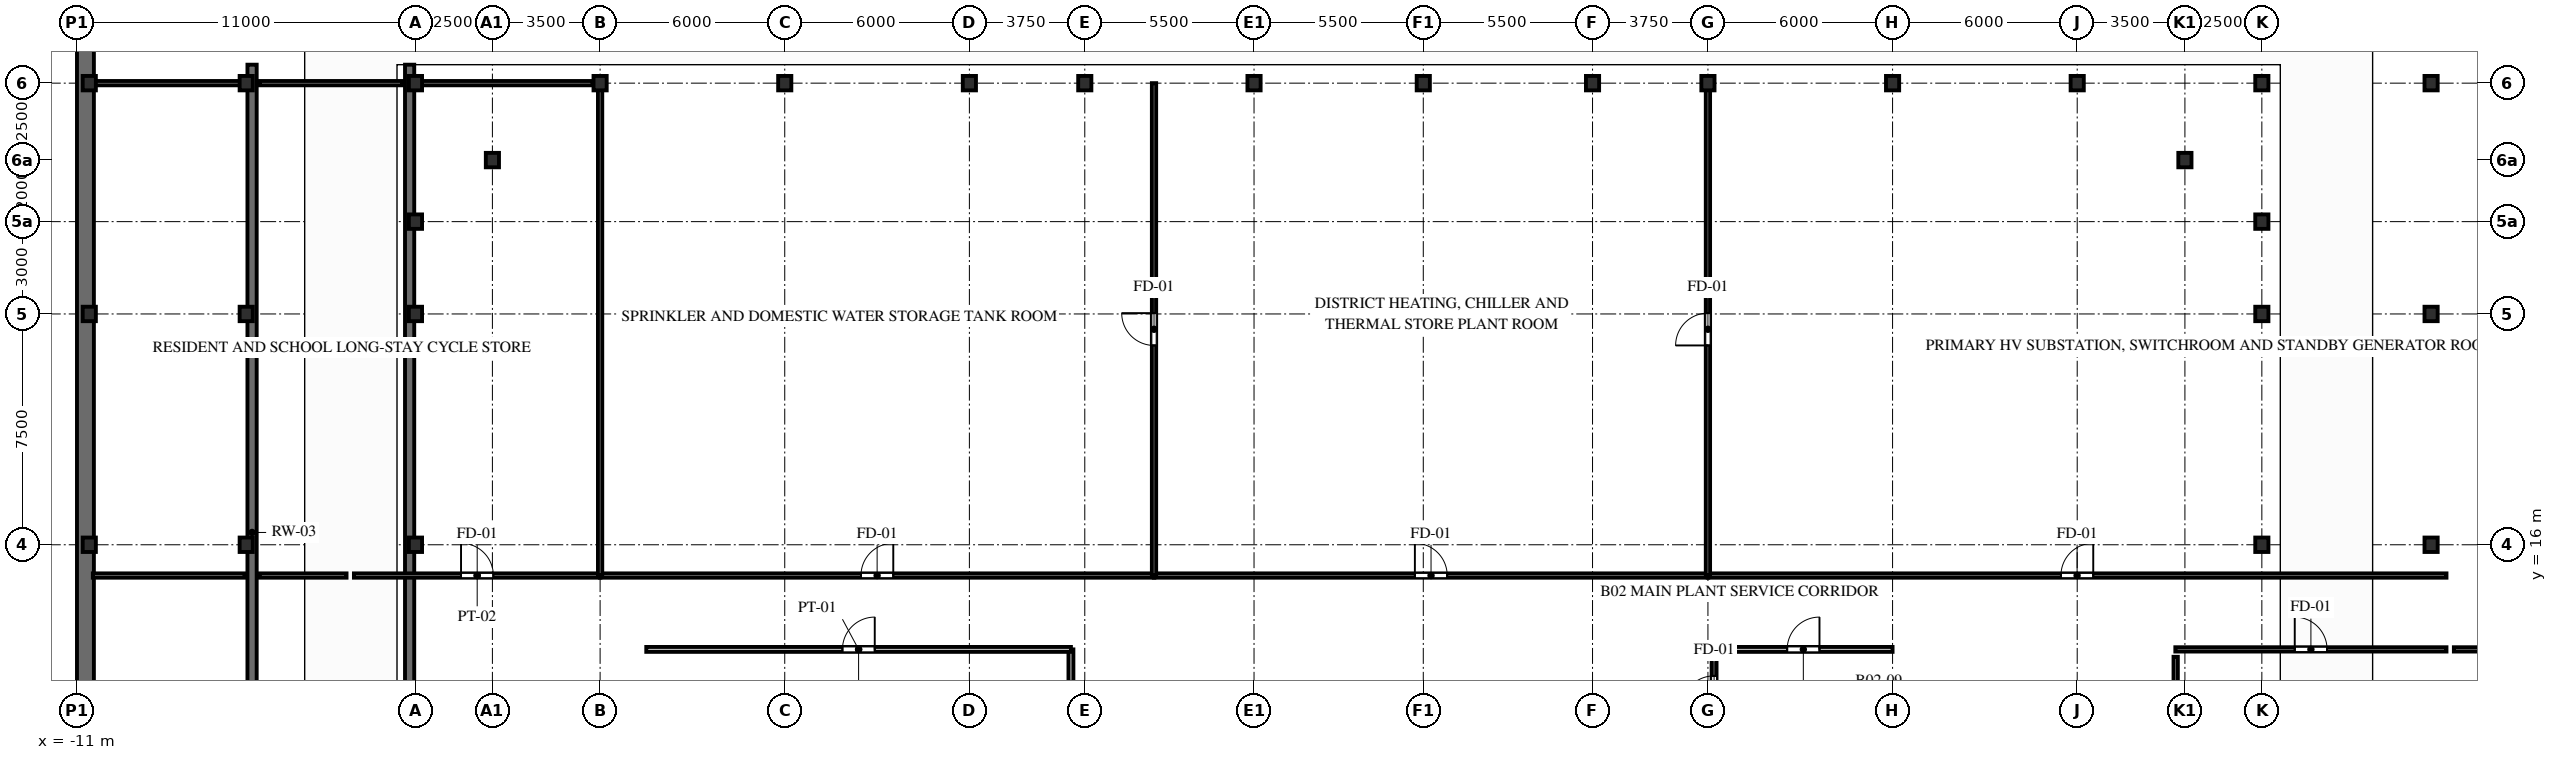
"""IFC4 building model, lengths in metres.
Left out: names, types, materials, properties, quantities, classifications, styles, units other than length and angle.
Written with IfcOpenShell. Run it as: python <this file> out.ifc"""

import sys

from ifc_helpers import new_model, si_unit, direction, frame, frame_2d, origin, origin_2d, place, context, subcontext, project, spatial, rectangle, i_section, extrude, element, fill, save


model = new_model("IFC4")
c1 = context("Model", 3, precision=1e-05, world=origin(), true_north=direction((0.0, 1.0)))
c2 = subcontext(c1, "Body", "Model", "MODEL_VIEW")
j1 = project(units=[si_unit("LENGTHUNIT", "METRE"), si_unit("PLANEANGLEUNIT", "RADIAN")], contexts=[c1])
p1 = place(None, origin())
s1 = spatial("IfcSite", under=j1, at=p1, CompositionType="ELEMENT")
p2 = place(p1, origin())
s2 = spatial("IfcBuilding", under=s1, at=p2, CompositionType="ELEMENT")
p3 = place(p2, frame((0.0, 0.0, -8.4)))
s3 = spatial("IfcBuildingStorey", under=s2, at=p3, CompositionType="ELEMENT", Elevation=-8.4)
for number, where, z_axis, x_axis in (
    (1, (-10.6, 16.0, 0.0), (0.0, 0.0, 1.0), (1.0, 0.0, 0.0)),
    (2, (-10.6, 23.5, 0.0), (0.0, 0.0, 1.0), (1.0, 0.0, 0.0)),
    (3, (-10.6, 31.0, 0.0), (0.0, 0.0, 1.0), (1.0, 0.0, 0.0)),
    (4, (-5.5, 16.0, 0.0), (0.0, 0.0, 1.0), (1.0, 0.0, 0.0)),
    (5, (-5.5, 23.5, 0.0), (0.0, 0.0, 1.0), (1.0, 0.0, 0.0)),
    (6, (-5.5, 31.0, 0.0), (0.0, 0.0, 1.0), (1.0, 0.0, 0.0)),
    (7, (0.0, 16.0, 0.0), (0.0, 0.0, 1.0), (1.0, 0.0, 0.0)),
    (8, (0.0, 23.5, 0.0), (0.0, 0.0, 1.0), (1.0, 0.0, 0.0)),
    (9, (0.0, 26.5, 0.0), (0.0, 0.0, 1.0), (1.0, 0.0, 0.0)),
    (10, (0.0, 31.0, 0.0), (0.0, 0.0, 1.0), (1.0, 0.0, 0.0)),
    (11, (2.5, 28.5, 0.0), (0.0, 0.0, 1.0), (1.0, 0.0, 0.0)),
    (12, (6.0, 31.0, 0.0), (0.0, 0.0, 1.0), (1.0, 0.0, 0.0)),
    (13, (12.0, 31.0, 0.0), (0.0, 0.0, 1.0), (1.0, 0.0, 0.0)),
    (14, (18.0, 31.0, 0.0), (0.0, 0.0, 1.0), (1.0, 0.0, 0.0)),
    (15, (21.75, 31.0, 0.0), (0.0, 0.0, 1.0), (1.0, 0.0, 0.0)),
    (16, (27.25, 31.0, 0.0), (0.0, 0.0, 1.0), (1.0, 0.0, 0.0)),
    (17, (32.75, 31.0, 0.0), (0.0, 0.0, 1.0), (1.0, 0.0, 0.0)),
    (18, (38.25, 31.0, 0.0), (0.0, 0.0, 1.0), (1.0, 0.0, 0.0)),
    (19, (42.0, 31.0, 0.0), (0.0, 0.0, 1.0), (1.0, 0.0, 0.0)),
    (20, (48.0, 31.0, 0.0), (0.0, 0.0, 1.0), (1.0, 0.0, 0.0)),
    (21, (54.0, 31.0, 0.0), (0.0, 0.0, 1.0), (1.0, 0.0, 0.0)),
    (22, (57.5, 28.5, 0.0), (0.0, 0.0, 1.0), (1.0, 0.0, 0.0)),
    (23, (60.0, 16.0, 0.0), (0.0, 0.0, 1.0), (1.0, 0.0, 0.0)),
    (24, (60.0, 23.5, 0.0), (0.0, 0.0, 1.0), (1.0, 0.0, 0.0)),
    (25, (60.0, 26.5, 0.0), (0.0, 0.0, 1.0), (1.0, 0.0, 0.0)),
    (26, (60.0, 31.0, 0.0), (0.0, 0.0, 1.0), (1.0, 0.0, 0.0)),
    (27, (65.5, 16.0, 0.0), (0.0, 0.0, 1.0), (1.0, 0.0, 0.0)),
    (28, (65.5, 23.5, 0.0), (0.0, 0.0, 1.0), (1.0, 0.0, 0.0)),
    (29, (65.5, 31.0, 0.0), (0.0, 0.0, 1.0), (1.0, 0.0, 0.0)),
):
    element("IfcColumn", number, at=place(p3, frame(where, z_axis=z_axis, x_axis=x_axis)), inside=s3, PredefinedType="COLUMN", context=c2, shape_type="SweptSolid", body=[
        extrude(i_section(OverallWidth=0.428, OverallDepth=0.469, WebThickness=0.078, FlangeThickness=0.125, FilletRadius=0.015, at=origin_2d()), origin(), (0.0, 0.0, 1.0), 4.2),
    ])
for number, where, z_axis, x_axis in (
    (30, (-5.31, 1.2, 0.0), (0.0, 0.0, 1.0), (0.0, 1.0, 0.0)),
    (31, (-0.19, 1.2, 0.0), (0.0, 0.0, 1.0), (0.0, 1.0, 0.0)),
):
    element("IfcWall", number, at=place(p3, frame(where, z_axis=z_axis, x_axis=x_axis)), inside=s3, PredefinedType="SHEAR", context=c2, shape_type="SweptSolid", body=[
        extrude(rectangle(XDim=30.4, YDim=0.3, at=frame_2d((15.2, 0.0))), origin(), (0.0, 0.0, 1.0), 3.84),
    ])
p4 = place(p3, frame((-10.725, 39.725, 0.0), z_axis=(0.0, 0.0, 1.0), x_axis=(0.0, -1.0, 0.0)))
e32 = element("IfcWall", 32, at=p4, inside=s3, PredefinedType="SHEAR", context=c2, shape_type="SweptSolid", body=[
    extrude(rectangle(XDim=41.45, YDim=0.55, at=frame_2d((20.725, 0.0))), origin(), (0.0, 0.0, 1.0), 3.2),
])
p5 = place(p3, frame((21.3, 9.5, 0.0), z_axis=(0.0, 0.0, 1.0), x_axis=(0.0, 1.0, 0.0)))
e33 = element("IfcWall", 33, at=p5, inside=s3, PredefinedType="PARTITIONING", context=c2, shape_type="SweptSolid", body=[
    extrude(rectangle(XDim=3.1, YDim=0.16, at=frame_2d((1.55, 0.0))), origin(), (0.0, 0.0, 1.0), 2.894),
])
p6 = place(p5, frame((1.025, 0.0, 0.0)))
e34 = element("IfcOpeningElement", 34, at=p6, cuts=e33, PredefinedType="OPENING", context=c2, shape_type="SweptSolid", body=[
    extrude(rectangle(XDim=1.05, YDim=2.06, at=frame_2d((0.525, 1.03))), frame((0.0, 0.09, 0.0), z_axis=(0.0, -1.0, 0.0), x_axis=(1.0, 0.0, 0.0)), (0.0, 0.0, 1.0), 0.18),
])
p7 = place(p3, frame((7.5, 12.6, 0.0), z_axis=(0.0, 0.0, 1.0), x_axis=(1.0, 0.0, 0.0)))
e35 = element("IfcWall", 35, at=p7, inside=s3, PredefinedType="PARTITIONING", context=c2, shape_type="SweptSolid", body=[
    extrude(rectangle(XDim=13.8, YDim=0.16, at=frame_2d((6.9, 0.0))), origin(), (0.0, 0.0, 1.0), 2.894),
])
p8 = place(p7, frame((6.375, 0.0, 0.0)))
e36 = element("IfcOpeningElement", 36, at=p8, cuts=e35, PredefinedType="OPENING", context=c2, shape_type="SweptSolid", body=[
    extrude(rectangle(XDim=1.05, YDim=2.06, at=frame_2d((0.525, 1.03))), frame((0.0, 0.09, 0.0), z_axis=(0.0, -1.0, 0.0), x_axis=(1.0, 0.0, 0.0)), (0.0, 0.0, 1.0), 0.18),
])
p9 = place(p3, frame((42.2, 9.83, 0.0), z_axis=(0.0, 0.0, 1.0), x_axis=(0.0, 1.0, 0.0)))
e37 = element("IfcWall", 37, at=p9, inside=s3, PredefinedType="PARTITIONING", context=c2, shape_type="SweptSolid", body=[
    extrude(rectangle(XDim=2.77, YDim=0.16, at=frame_2d((1.385, 0.0))), origin(), (0.0, 0.0, 1.0), 2.894),
])
p10 = place(p9, frame((0.86, 0.0, 0.0)))
e38 = element("IfcOpeningElement", 38, at=p10, cuts=e37, PredefinedType="OPENING", context=c2, shape_type="SweptSolid", body=[
    extrude(rectangle(XDim=1.05, YDim=2.06, at=frame_2d((0.525, 1.03))), frame((0.0, 0.09, 0.0), z_axis=(0.0, -1.0, 0.0), x_axis=(1.0, 0.0, 0.0)), (0.0, 0.0, 1.0), 0.18),
])
p11 = place(p3, frame((42.2, 12.6, 0.0), z_axis=(0.0, 0.0, 1.0), x_axis=(1.0, 0.0, 0.0)))
e39 = element("IfcWall", 39, at=p11, inside=s3, PredefinedType="PARTITIONING", context=c2, shape_type="SweptSolid", body=[
    extrude(rectangle(XDim=5.8, YDim=0.16, at=frame_2d((2.9, 0.0))), origin(), (0.0, 0.0, 1.0), 2.894),
])
p12 = place(p11, frame((2.375, 0.0, 0.0)))
e40 = element("IfcOpeningElement", 40, at=p12, cuts=e39, PredefinedType="OPENING", context=c2, shape_type="SweptSolid", body=[
    extrude(rectangle(XDim=1.05, YDim=2.06, at=frame_2d((0.525, 1.03))), frame((0.0, 0.09, 0.0), z_axis=(0.0, -1.0, 0.0), x_axis=(1.0, 0.0, 0.0)), (0.0, 0.0, 1.0), 0.18),
])
p13 = place(p3, frame((-2.0, 15.0, 0.0), z_axis=(0.0, 0.0, 1.0), x_axis=(1.0, 0.0, 0.0)))
e41 = element("IfcWall", 41, at=p13, inside=s3, PredefinedType="PARTITIONING", context=c2, shape_type="SweptSolid", body=[
    extrude(rectangle(XDim=8.011, YDim=0.14, at=frame_2d((4.006, 0.0))), origin(), (0.0, 0.0, 1.0), 2.894),
])
p14 = place(p13, frame((3.481, 0.0, 0.0)))
e42 = element("IfcOpeningElement", 42, at=p14, cuts=e41, PredefinedType="OPENING", context=c2, shape_type="SweptSolid", body=[
    extrude(rectangle(XDim=1.05, YDim=2.06, at=frame_2d((0.525, 1.03))), frame((0.0, 0.08, 0.0), z_axis=(0.0, -1.0, 0.0), x_axis=(1.0, 0.0, 0.0)), (0.0, 0.0, 1.0), 0.16),
])
p15 = place(p3, frame((5.993, 15.0, 0.0), z_axis=(0.0, 0.0, 1.0), x_axis=(1.0, 0.0, 0.0)))
e43 = element("IfcWall", 43, at=p15, inside=s3, PredefinedType="PARTITIONING", context=c2, shape_type="SweptSolid", body=[
    extrude(rectangle(XDim=18.019, YDim=0.14, at=frame_2d((9.009, 0.0))), origin(), (0.0, 0.0, 1.0), 2.894),
])
p16 = place(p15, frame((8.484, 0.0, 0.0)))
e44 = element("IfcOpeningElement", 44, at=p16, cuts=e43, PredefinedType="OPENING", context=c2, shape_type="SweptSolid", body=[
    extrude(rectangle(XDim=1.05, YDim=2.06, at=frame_2d((0.525, 1.03))), frame((0.0, 0.08, 0.0), z_axis=(0.0, -1.0, 0.0), x_axis=(1.0, 0.0, 0.0)), (0.0, 0.0, 1.0), 0.16),
])
p17 = place(p3, frame((23.993, 15.0, 0.0), z_axis=(0.0, 0.0, 1.0), x_axis=(1.0, 0.0, 0.0)))
e45 = element("IfcWall", 45, at=p17, inside=s3, PredefinedType="PARTITIONING", context=c2, shape_type="SweptSolid", body=[
    extrude(rectangle(XDim=18.019, YDim=0.14, at=frame_2d((9.009, 0.0))), origin(), (0.0, 0.0, 1.0), 2.894),
])
p18 = place(p17, frame((8.484, 0.0, 0.0)))
e46 = element("IfcOpeningElement", 46, at=p18, cuts=e45, PredefinedType="OPENING", context=c2, shape_type="SweptSolid", body=[
    extrude(rectangle(XDim=1.05, YDim=2.06, at=frame_2d((0.525, 1.03))), frame((0.0, 0.08, 0.0), z_axis=(0.0, -1.0, 0.0), x_axis=(1.0, 0.0, 0.0)), (0.0, 0.0, 1.0), 0.16),
])
p19 = place(p3, frame((41.993, 15.0, 0.0), z_axis=(0.0, 0.0, 1.0), x_axis=(1.0, 0.0, 0.0)))
e47 = element("IfcWall", 47, at=p19, inside=s3, PredefinedType="PARTITIONING", context=c2, shape_type="SweptSolid", body=[
    extrude(rectangle(XDim=24.007, YDim=0.14, at=frame_2d((12.004, 0.0))), origin(), (0.0, 0.0, 1.0), 2.894),
])
p20 = place(p19, frame((11.479, 0.0, 0.0)))
e48 = element("IfcOpeningElement", 48, at=p20, cuts=e47, PredefinedType="OPENING", context=c2, shape_type="SweptSolid", body=[
    extrude(rectangle(XDim=1.05, YDim=2.06, at=frame_2d((0.525, 1.03))), frame((0.0, 0.08, 0.0), z_axis=(0.0, -1.0, 0.0), x_axis=(1.0, 0.0, 0.0)), (0.0, 0.0, 1.0), 0.16),
])
p21 = place(p3, frame((57.189, 12.6, 0.0), z_axis=(0.0, 0.0, 1.0), x_axis=(1.0, 0.0, 0.0)))
e49 = element("IfcWall", 49, at=p21, inside=s3, PredefinedType="PARTITIONING", context=c2, shape_type="SweptSolid", body=[
    extrude(rectangle(XDim=8.811, YDim=0.14, at=frame_2d((4.406, 0.0))), origin(), (0.0, 0.0, 1.0), 2.894),
])
p22 = place(p21, frame((3.881, 0.0, 0.0)))
e50 = element("IfcOpeningElement", 50, at=p22, cuts=e49, PredefinedType="OPENING", context=c2, shape_type="SweptSolid", body=[
    extrude(rectangle(XDim=1.05, YDim=2.06, at=frame_2d((0.525, 1.03))), frame((0.0, 0.08, 0.0), z_axis=(0.0, -1.0, 0.0), x_axis=(1.0, 0.0, 0.0)), (0.0, 0.0, 1.0), 0.16),
])
p23 = place(p3, frame((6.0, 15.004, 0.0), z_axis=(0.0, 0.0, 1.0), x_axis=(0.0, 1.0, 0.0)))
e51 = element("IfcWall", 51, at=p23, inside=s3, PredefinedType="PARTITIONING", context=c2, shape_type="SweptSolid", body=[
    extrude(rectangle(XDim=15.996, YDim=0.14, at=frame_2d((7.998, 0.0))), origin(), (0.0, 0.0, 1.0), 2.894),
])
p24 = place(p3, frame((24.0, 15.004, 0.0), z_axis=(0.0, 0.0, 1.0), x_axis=(0.0, 1.0, 0.0)))
e52 = element("IfcWall", 52, at=p24, inside=s3, PredefinedType="PARTITIONING", context=c2, shape_type="SweptSolid", body=[
    extrude(rectangle(XDim=15.996, YDim=0.14, at=frame_2d((7.998, 0.0))), origin(), (0.0, 0.0, 1.0), 3.203),
])
p25 = place(p24, frame((7.473, 0.0, 0.0)))
e53 = element("IfcOpeningElement", 53, at=p25, cuts=e52, PredefinedType="OPENING", context=c2, shape_type="SweptSolid", body=[
    extrude(rectangle(XDim=1.05, YDim=2.06, at=frame_2d((0.525, 1.03))), frame((0.0, 0.08, 0.0), z_axis=(0.0, -1.0, 0.0), x_axis=(1.0, 0.0, 0.0)), (0.0, 0.0, 1.0), 0.16),
])
p26 = place(p3, frame((42.0, 15.004, 0.0), z_axis=(0.0, 0.0, 1.0), x_axis=(0.0, 1.0, 0.0)))
e54 = element("IfcWall", 54, at=p26, inside=s3, PredefinedType="PARTITIONING", context=c2, shape_type="SweptSolid", body=[
    extrude(rectangle(XDim=15.996, YDim=0.14, at=frame_2d((7.998, 0.0))), origin(), (0.0, 0.0, 1.0), 2.894),
])
p27 = place(p26, frame((7.473, 0.0, 0.0)))
e55 = element("IfcOpeningElement", 55, at=p27, cuts=e54, PredefinedType="OPENING", context=c2, shape_type="SweptSolid", body=[
    extrude(rectangle(XDim=1.05, YDim=2.06, at=frame_2d((0.525, 1.03))), frame((0.0, 0.08, 0.0), z_axis=(0.0, -1.0, 0.0), x_axis=(1.0, 0.0, 0.0)), (0.0, 0.0, 1.0), 0.16),
])
p28 = place(p3, frame((-10.485, 15.0, 0.0), z_axis=(0.0, 0.0, 1.0), x_axis=(1.0, 0.0, 0.0)))
e56 = element("IfcWall", 56, at=p28, inside=s3, PredefinedType="PARTITIONING", context=c2, shape_type="SweptSolid", body=[
    extrude(rectangle(XDim=4.935, YDim=0.14, at=frame_2d((2.468, 0.0))), origin(), (0.0, 0.0, 1.0), 2.894),
])
p29 = place(p3, frame((-5.07, 15.0, 0.0), z_axis=(0.0, 0.0, 1.0), x_axis=(1.0, 0.0, 0.0)))
e57 = element("IfcWall", 57, at=p29, inside=s3, PredefinedType="PARTITIONING", context=c2, shape_type="SweptSolid", body=[
    extrude(rectangle(XDim=2.83, YDim=0.14, at=frame_2d((1.415, 0.0))), origin(), (0.0, 0.0, 1.0), 3.84),
])
p30 = place(p3, frame((0.05, 31.0, 0.0), z_axis=(0.0, 0.0, 1.0), x_axis=(1.0, 0.0, 0.0)))
e58 = element("IfcWall", 58, at=p30, inside=s3, PredefinedType="PARTITIONING", context=c2, shape_type="SweptSolid", body=[
    extrude(rectangle(XDim=5.71, YDim=0.14, at=frame_2d((2.855, 0.0))), origin(), (0.0, 0.0, 1.0), 3.203),
])
p31 = place(p3, frame((-5.07, 31.0, 0.0), z_axis=(0.0, 0.0, 1.0), x_axis=(1.0, 0.0, 0.0)))
e59 = element("IfcWall", 59, at=p31, inside=s3, PredefinedType="PARTITIONING", context=c2, shape_type="SweptSolid", body=[
    extrude(rectangle(XDim=4.64, YDim=0.14, at=frame_2d((2.32, 0.0))), origin(), (0.0, 0.0, 1.0), 3.84),
])
p32 = place(p3, frame((-10.485, 31.0, 0.0), z_axis=(0.0, 0.0, 1.0), x_axis=(1.0, 0.0, 0.0)))
e60 = element("IfcWall", 60, at=p32, inside=s3, PredefinedType="PARTITIONING", context=c2, shape_type="SweptSolid", body=[
    extrude(rectangle(XDim=4.935, YDim=0.14, at=frame_2d((2.468, 0.0))), origin(), (0.0, 0.0, 1.0), 3.203),
])
p33 = place(p3, frame((66.24, 12.6, 0.0), z_axis=(0.0, 0.0, 1.0), x_axis=(1.0, 0.0, 0.0)))
e61 = element("IfcWall", 61, at=p33, inside=s3, PredefinedType="PARTITIONING", context=c2, shape_type="SweptSolid", body=[
    extrude(rectangle(XDim=4.245, YDim=0.14, at=frame_2d((2.123, 0.0))), origin(), (0.0, 0.0, 1.0), 3.203),
])
p34 = place(p3, frame((57.2, 9.781, 0.0), z_axis=(0.0, 0.0, 1.0), x_axis=(0.0, 1.0, 0.0)))
e62 = element("IfcWall", 62, at=p34, inside=s3, PredefinedType="PARTITIONING", context=c2, shape_type="SweptSolid", body=[
    extrude(rectangle(XDim=2.579, YDim=0.14, at=frame_2d((1.289, 0.0))), origin(), (0.0, 0.0, 1.0), 2.894),
])
p35 = place(p8, origin())
e63 = element("IfcDoor", 63, at=p35, inside=s3, OperationType="SINGLE_SWING_RIGHT", PredefinedType="DOOR", context=c2, shape_type="SweptSolid", body=[
    extrude(rectangle(XDim=1.05, YDim=2.06, at=frame_2d((0.525, 1.03))), frame((0.0, 0.025, 0.0), z_axis=(0.0, -1.0, 0.0), x_axis=(1.0, 0.0, 0.0)), (0.0, 0.0, 1.0), 0.05),
])
fill(e36, e63)
p36 = place(p10, origin())
e64 = element("IfcDoor", 64, at=p36, inside=s3, OperationType="SINGLE_SWING_LEFT", PredefinedType="DOOR", context=c2, shape_type="SweptSolid", body=[
    extrude(rectangle(XDim=1.05, YDim=2.06, at=frame_2d((0.525, 1.03))), frame((0.0, 0.025, 0.0), z_axis=(0.0, -1.0, 0.0), x_axis=(1.0, 0.0, 0.0)), (0.0, 0.0, 1.0), 0.05),
])
fill(e38, e64)
p37 = place(p12, origin())
e65 = element("IfcDoor", 65, at=p37, inside=s3, OperationType="SINGLE_SWING_RIGHT", PredefinedType="DOOR", context=c2, shape_type="SweptSolid", body=[
    extrude(rectangle(XDim=1.05, YDim=2.06, at=frame_2d((0.525, 1.03))), frame((0.0, 0.025, 0.0), z_axis=(0.0, -1.0, 0.0), x_axis=(1.0, 0.0, 0.0)), (0.0, 0.0, 1.0), 0.05),
])
fill(e40, e65)
p38 = place(p14, origin())
e66 = element("IfcDoor", 66, at=p38, inside=s3, OperationType="SINGLE_SWING_LEFT", PredefinedType="DOOR", context=c2, shape_type="SweptSolid", body=[
    extrude(rectangle(XDim=1.05, YDim=2.06, at=frame_2d((0.525, 1.03))), frame((0.0, 0.025, 0.0), z_axis=(0.0, -1.0, 0.0), x_axis=(1.0, 0.0, 0.0)), (0.0, 0.0, 1.0), 0.05),
])
fill(e42, e66)
p39 = place(p16, origin())
e67 = element("IfcDoor", 67, at=p39, inside=s3, OperationType="SINGLE_SWING_RIGHT", PredefinedType="DOOR", context=c2, shape_type="SweptSolid", body=[
    extrude(rectangle(XDim=1.05, YDim=2.06, at=frame_2d((0.525, 1.03))), frame((0.0, 0.025, 0.0), z_axis=(0.0, -1.0, 0.0), x_axis=(1.0, 0.0, 0.0)), (0.0, 0.0, 1.0), 0.05),
])
fill(e44, e67)
p40 = place(p18, origin())
e68 = element("IfcDoor", 68, at=p40, inside=s3, OperationType="SINGLE_SWING_LEFT", PredefinedType="DOOR", context=c2, shape_type="SweptSolid", body=[
    extrude(rectangle(XDim=1.05, YDim=2.06, at=frame_2d((0.525, 1.03))), frame((0.0, 0.025, 0.0), z_axis=(0.0, -1.0, 0.0), x_axis=(1.0, 0.0, 0.0)), (0.0, 0.0, 1.0), 0.05),
])
fill(e46, e68)
p41 = place(p20, origin())
e69 = element("IfcDoor", 69, at=p41, inside=s3, OperationType="SINGLE_SWING_RIGHT", PredefinedType="DOOR", context=c2, shape_type="SweptSolid", body=[
    extrude(rectangle(XDim=1.05, YDim=2.06, at=frame_2d((0.525, 1.03))), frame((0.0, 0.025, 0.0), z_axis=(0.0, -1.0, 0.0), x_axis=(1.0, 0.0, 0.0)), (0.0, 0.0, 1.0), 0.05),
])
fill(e48, e69)
p42 = place(p22, origin())
e70 = element("IfcDoor", 70, at=p42, inside=s3, OperationType="SINGLE_SWING_LEFT", PredefinedType="DOOR", context=c2, shape_type="SweptSolid", body=[
    extrude(rectangle(XDim=1.05, YDim=2.06, at=frame_2d((0.525, 1.03))), frame((0.0, 0.025, 0.0), z_axis=(0.0, -1.0, 0.0), x_axis=(1.0, 0.0, 0.0)), (0.0, 0.0, 1.0), 0.05),
])
fill(e50, e70)
p43 = place(p25, origin())
e71 = element("IfcDoor", 71, at=p43, inside=s3, OperationType="SINGLE_SWING_RIGHT", PredefinedType="DOOR", context=c2, shape_type="SweptSolid", body=[
    extrude(rectangle(XDim=1.05, YDim=2.06, at=frame_2d((0.525, 1.03))), frame((0.0, 0.025, 0.0), z_axis=(0.0, -1.0, 0.0), x_axis=(1.0, 0.0, 0.0)), (0.0, 0.0, 1.0), 0.05),
])
fill(e53, e71)
p44 = place(p27, origin())
e72 = element("IfcDoor", 72, at=p44, inside=s3, OperationType="SINGLE_SWING_LEFT", PredefinedType="DOOR", context=c2, shape_type="SweptSolid", body=[
    extrude(rectangle(XDim=1.05, YDim=2.06, at=frame_2d((0.525, 1.03))), frame((0.0, 0.025, 0.0), z_axis=(0.0, -1.0, 0.0), x_axis=(1.0, 0.0, 0.0)), (0.0, 0.0, 1.0), 0.05),
])
fill(e55, e72)
save(model, sys.argv[1])
